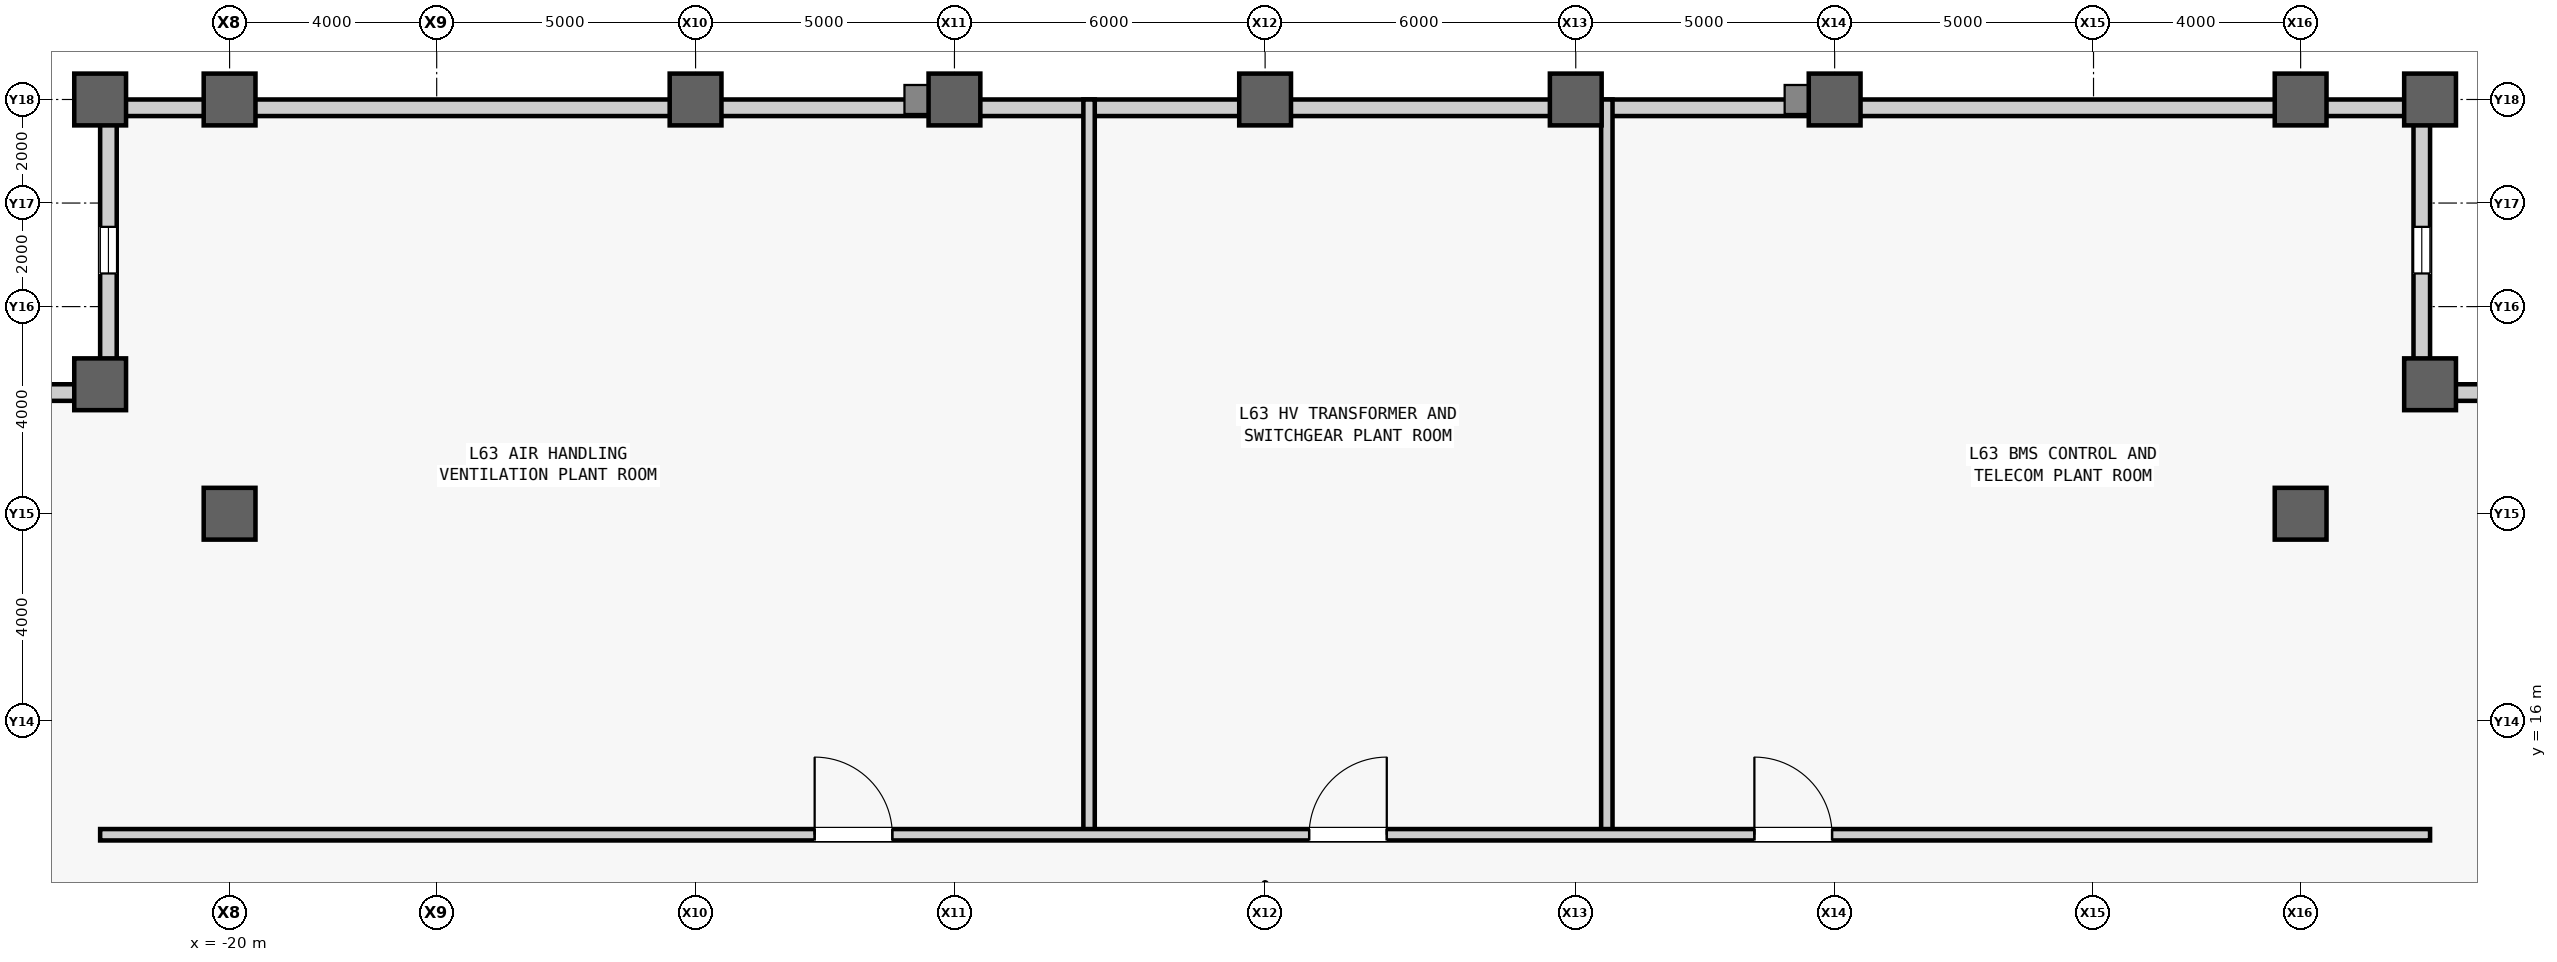
"""IFC4 building model, lengths in metres.
Left out: names, types, materials, properties, quantities, classifications, styles, units other than length and angle.
Written with IfcOpenShell. Run it as: python <this file> out.ifc"""

import sys

from ifc_helpers import new_model, si_unit, direction, frame, frame_2d, origin, origin_2d, place, context, subcontext, project, spatial, rectangle, hollow_rectangle, extrude, source, transform, mapped, element, fill, save


model = new_model("IFC4")
c1 = context("Model", 3, precision=1e-05, world=origin(), true_north=direction((0.0, 1.0)))
c2 = subcontext(c1, "Body", "Model", "MODEL_VIEW")
j1 = project(units=[si_unit("LENGTHUNIT", "METRE"), si_unit("PLANEANGLEUNIT", "RADIAN")], contexts=[c1])
p1 = place(None, origin())
s1 = spatial("IfcSite", under=j1, at=p1, CompositionType="ELEMENT")
p2 = place(p1, origin())
s2 = spatial("IfcBuilding", under=s1, at=p2, CompositionType="ELEMENT")
p3 = place(p2, frame((0.0, 0.0, 268.3)))
s3 = spatial("IfcBuildingStorey", under=s2, at=p3, CompositionType="ELEMENT", Elevation=268.3)
m1 = source(origin(), c2, "Body", "SweptSolid", [
    extrude(hollow_rectangle(XDim=1.0, YDim=1.0, WallThickness=0.055, at=origin_2d()), origin(), (0.0, 0.0, 1.0), 5.2),
])
for number, where, z_axis, x_axis in (
    (1, (-22.5, 22.5, 0.0), (0.0, 0.0, 1.0), (1.0, 0.0, 0.0)),
    (2, (-22.5, 28.0, 0.0), (0.0, 0.0, 1.0), (1.0, 0.0, 0.0)),
    (3, (-20.0, 20.0, 0.0), (0.0, 0.0, 1.0), (1.0, 0.0, 0.0)),
    (4, (-20.0, 28.0, 0.0), (0.0, 0.0, 1.0), (1.0, 0.0, 0.0)),
    (5, (-11.0, 28.0, 0.0), (0.0, 0.0, 1.0), (1.0, 0.0, 0.0)),
    (6, (-6.0, 28.0, 0.0), (0.0, 0.0, 1.0), (1.0, 0.0, 0.0)),
    (7, (0.0, 28.0, 0.0), (0.0, 0.0, 1.0), (1.0, 0.0, 0.0)),
    (8, (6.0, 28.0, 0.0), (0.0, 0.0, 1.0), (1.0, 0.0, 0.0)),
    (9, (11.0, 28.0, 0.0), (0.0, 0.0, 1.0), (1.0, 0.0, 0.0)),
    (10, (20.0, 20.0, 0.0), (0.0, 0.0, 1.0), (1.0, 0.0, 0.0)),
    (11, (20.0, 28.0, 0.0), (0.0, 0.0, 1.0), (1.0, 0.0, 0.0)),
    (12, (22.5, 22.5, 0.0), (0.0, 0.0, 1.0), (1.0, 0.0, 0.0)),
    (13, (22.5, 28.0, 0.0), (0.0, 0.0, 1.0), (1.0, 0.0, 0.0)),
):
    element("IfcColumn", number, at=place(p3, frame(where, z_axis=z_axis, x_axis=x_axis)), inside=s3, PredefinedType="COLUMN", context=c2, shape_type="MappedRepresentation", body=[
        mapped(m1, transform((0.0, 0.0, 0.0), scale=1.0)),
    ])
m2 = source(origin(), c2, "Body", "SweptSolid", [
    extrude(rectangle(XDim=5.18, YDim=0.32, at=frame_2d((2.59, 0.0))), origin(), (0.0, 0.0, 1.0), 4.364),
])
p4 = place(p3, frame((22.5, 22.34, 0.0), z_axis=(0.0, 0.0, 1.0), x_axis=(1.0, 0.0, 0.0)))
e14 = element("IfcWall", 14, at=p4, inside=s3, PredefinedType="STANDARD", context=c2, shape_type="MappedRepresentation", body=[
    mapped(m2, transform((0.0, 0.0, 0.0), scale=1.0)),
])
m3 = source(origin(), c2, "Body", "SweptSolid", [
    extrude(rectangle(XDim=0.9, YDim=2.4, at=frame_2d((0.45, 1.2))), frame((0.0, 0.17, 0.0), z_axis=(0.0, -1.0, 0.0), x_axis=(1.0, 0.0, 0.0)), (0.0, 0.0, 1.0), 0.34),
])
p5 = place(p4, frame((2.14, 0.0, 0.7)))
e15 = element("IfcOpeningElement", 15, at=p5, cuts=e14, PredefinedType="OPENING", context=c2, shape_type="MappedRepresentation", body=[
    mapped(m3, transform((0.0, 0.0, 0.0), scale=1.0)),
])
m4 = source(origin(), c2, "Body", "SweptSolid", [
    extrude(rectangle(XDim=5.18, YDim=0.32, at=frame_2d((2.59, 0.0))), origin(), (0.0, 0.0, 1.0), 4.284),
])
p6 = place(p3, frame((22.34, 22.5, 0.0), z_axis=(0.0, 0.0, 1.0), x_axis=(0.0, 1.0, 0.0)))
e16 = element("IfcWall", 16, at=p6, inside=s3, PredefinedType="STANDARD", context=c2, shape_type="MappedRepresentation", body=[
    mapped(m4, transform((0.0, 0.0, 0.0), scale=1.0)),
])
p7 = place(p6, frame((2.14, 0.0, 0.7)))
e17 = element("IfcOpeningElement", 17, at=p7, cuts=e16, PredefinedType="OPENING", context=c2, shape_type="MappedRepresentation", body=[
    mapped(m3, transform((0.0, 0.0, 0.0), scale=1.0)),
])
p8 = place(p3, frame((-22.34, 22.5, 0.0), z_axis=(0.0, 0.0, 1.0), x_axis=(0.0, 1.0, 0.0)))
e18 = element("IfcWall", 18, at=p8, inside=s3, PredefinedType="STANDARD", context=c2, shape_type="MappedRepresentation", body=[
    mapped(m4, transform((0.0, 0.0, 0.0), scale=1.0)),
])
p9 = place(p8, frame((2.14, 0.0, 0.7)))
e19 = element("IfcOpeningElement", 19, at=p9, cuts=e18, PredefinedType="OPENING", context=c2, shape_type="MappedRepresentation", body=[
    mapped(m3, transform((0.0, 0.0, 0.0), scale=1.0)),
])
p10 = place(p3, frame((-22.5, 22.34, 0.0), z_axis=(0.0, 0.0, 1.0), x_axis=(-1.0, 0.0, 0.0)))
e20 = element("IfcWall", 20, at=p10, inside=s3, PredefinedType="STANDARD", context=c2, shape_type="MappedRepresentation", body=[
    mapped(m2, transform((0.0, 0.0, 0.0), scale=1.0)),
])
p11 = place(p10, frame((2.14, 0.0, 0.7)))
e21 = element("IfcOpeningElement", 21, at=p11, cuts=e20, PredefinedType="OPENING", context=c2, shape_type="MappedRepresentation", body=[
    mapped(m3, transform((0.0, 0.0, 0.0), scale=1.0)),
])
m5 = source(origin(), c2, "Body", "SweptSolid", [
    extrude(rectangle(XDim=45.0, YDim=0.32, at=frame_2d((22.5, 0.0))), origin(), (0.0, 0.0, 1.0), 4.284),
])
p12 = place(p3, frame((-22.5, 27.84, 0.0), z_axis=(0.0, 0.0, 1.0), x_axis=(1.0, 0.0, 0.0)))
e22 = element("IfcWall", 22, at=p12, inside=s3, PredefinedType="STANDARD", context=c2, shape_type="MappedRepresentation", body=[
    mapped(m5, transform((0.0, 0.0, 0.0), scale=1.0)),
])
m6 = source(origin(), c2, "Body", "SweptSolid", [
    extrude(rectangle(XDim=14.2, YDim=0.22, at=frame_2d((7.1, 0.0))), origin(), (0.0, 0.0, 1.0), 4.98),
])
for number, where, z_axis, x_axis in (
    (23, (-3.4, 13.8, 0.0), (0.0, 0.0, 1.0), (0.0, 1.0, 0.0)),
    (24, (6.6, 13.8, 0.0), (0.0, 0.0, 1.0), (0.0, 1.0, 0.0)),
):
    element("IfcWall", number, at=place(p3, frame(where, z_axis=z_axis, x_axis=x_axis)), inside=s3, PredefinedType="PARTITIONING", context=c2, shape_type="MappedRepresentation", body=[
        mapped(m6, transform((0.0, 0.0, 0.0), scale=1.0)),
    ])
m7 = source(origin(), c2, "Body", "SweptSolid", [
    extrude(rectangle(XDim=45.0, YDim=0.22, at=frame_2d((22.5, 0.0))), origin(), (0.0, 0.0, 1.0), 4.98),
])
p13 = place(p3, frame((-22.5, 13.8, 0.0), z_axis=(0.0, 0.0, 1.0), x_axis=(1.0, 0.0, 0.0)))
e25 = element("IfcWall", 25, at=p13, inside=s3, PredefinedType="PARTITIONING", context=c2, shape_type="MappedRepresentation", body=[
    mapped(m7, transform((0.0, 0.0, 0.0), scale=1.0)),
])
m8 = source(origin(), c2, "Body", "SweptSolid", [
    extrude(rectangle(XDim=1.5, YDim=2.3, at=frame_2d((0.75, 1.15))), frame((0.0, 0.12, 0.0), z_axis=(0.0, -1.0, 0.0), x_axis=(1.0, 0.0, 0.0)), (0.0, 0.0, 1.0), 0.24),
])
p14 = place(p13, frame((13.8, 0.0, 0.0)))
e26 = element("IfcOpeningElement", 26, at=p14, cuts=e25, PredefinedType="OPENING", context=c2, shape_type="MappedRepresentation", body=[
    mapped(m8, transform((0.0, 0.0, 0.0), scale=1.0)),
])
p15 = place(p13, frame((23.35, 0.0, 0.0)))
e27 = element("IfcOpeningElement", 27, at=p15, cuts=e25, PredefinedType="OPENING", context=c2, shape_type="MappedRepresentation", body=[
    mapped(m8, transform((0.0, 0.0, 0.0), scale=1.0)),
])
p16 = place(p13, frame((31.95, 0.0, 0.0)))
e28 = element("IfcOpeningElement", 28, at=p16, cuts=e25, PredefinedType="OPENING", context=c2, shape_type="MappedRepresentation", body=[
    mapped(m8, transform((0.0, 0.0, 0.0), scale=1.0)),
])
m9 = source(origin(), c2, "Body", "SweptSolid", [
    extrude(rectangle(XDim=0.9, YDim=2.4, at=frame_2d((0.45, 1.2))), frame((0.0, 0.03, 0.0), z_axis=(0.0, -1.0, 0.0), x_axis=(1.0, 0.0, 0.0)), (0.0, 0.0, 1.0), 0.06),
])
p17 = place(p7, origin())
e29 = element("IfcWindow", 29, at=p17, inside=s3, PartitioningType="SINGLE_PANEL", PredefinedType="WINDOW", context=c2, shape_type="MappedRepresentation", body=[
    mapped(m9, transform((0.0, 0.0, 0.0), scale=1.0)),
])
fill(e17, e29)
p18 = place(p9, origin())
e30 = element("IfcWindow", 30, at=p18, inside=s3, PartitioningType="SINGLE_PANEL", PredefinedType="WINDOW", context=c2, shape_type="MappedRepresentation", body=[
    mapped(m9, transform((0.0, 0.0, 0.0), scale=1.0)),
])
fill(e19, e30)
m10 = source(origin(), c2, "Body", "SweptSolid", [
    extrude(rectangle(XDim=1.5, YDim=2.3, at=frame_2d((0.75, 1.15))), frame((0.0, 0.025, 0.0), z_axis=(0.0, -1.0, 0.0), x_axis=(1.0, 0.0, 0.0)), (0.0, 0.0, 1.0), 0.05),
])
p19 = place(p14, origin())
e31 = element("IfcDoor", 31, at=p19, inside=s3, OperationType="SINGLE_SWING_LEFT", PredefinedType="DOOR", context=c2, shape_type="MappedRepresentation", body=[
    mapped(m10, transform((0.0, 0.0, 0.0), scale=1.0)),
])
fill(e26, e31)
p20 = place(p15, origin())
e32 = element("IfcDoor", 32, at=p20, inside=s3, OperationType="SINGLE_SWING_RIGHT", PredefinedType="DOOR", context=c2, shape_type="MappedRepresentation", body=[
    mapped(m10, transform((0.0, 0.0, 0.0), scale=1.0)),
])
fill(e27, e32)
p21 = place(p16, origin())
e33 = element("IfcDoor", 33, at=p21, inside=s3, OperationType="SINGLE_SWING_LEFT", PredefinedType="DOOR", context=c2, shape_type="MappedRepresentation", body=[
    mapped(m10, transform((0.0, 0.0, 0.0), scale=1.0)),
])
fill(e28, e33)
save(model, sys.argv[1])
